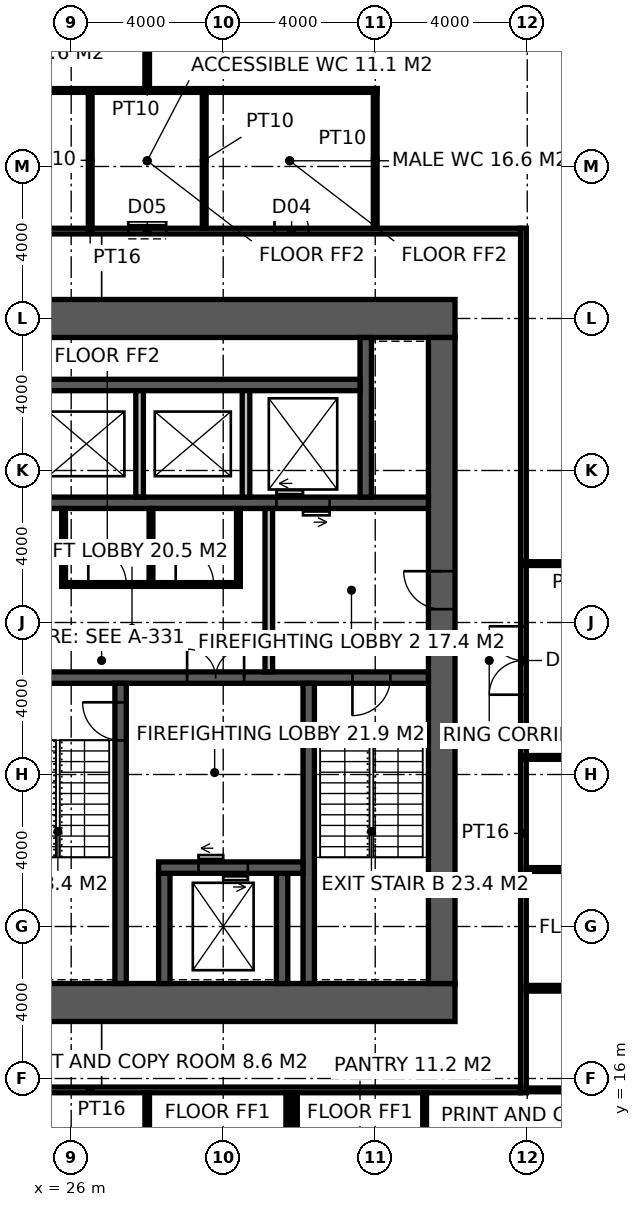
"""IFC4 building model, lengths in metres.
Left out: names, types, materials, properties, quantities, classifications, styles, units other than length and angle.
Written with IfcOpenShell. Run it as: python <this file> out.ifc"""

import sys

from ifc_helpers import new_model, si_unit, direction, frame, frame_2d, origin, place, context, subcontext, project, spatial, rectangle, extrude, element, fill, save


model = new_model("IFC4")
c1 = context("Model", 3, precision=1e-05, world=origin(), true_north=direction((0.0, 1.0)))
c2 = subcontext(c1, "Body", "Model", "MODEL_VIEW")
j1 = project(units=[si_unit("LENGTHUNIT", "METRE"), si_unit("PLANEANGLEUNIT", "RADIAN")], contexts=[c1])
p1 = place(None, origin())
s1 = spatial("IfcSite", under=j1, at=p1, CompositionType="ELEMENT")
p2 = place(p1, origin())
s2 = spatial("IfcBuilding", under=s1, at=p2, CompositionType="ELEMENT")
p3 = place(p2, frame((0.0, 0.0, 175.8)))
s3 = spatial("IfcBuildingStorey", under=s2, at=p3, CompositionType="ELEMENT", Elevation=175.8)
p4 = place(p3, frame((18.5, 18.0, -0.15), z_axis=(0.0, 0.0, 1.0), x_axis=(1.0, 0.0, 0.0)))
e1 = element("IfcWall", 1, at=p4, inside=s3, PredefinedType="SHEAR", context=c2, shape_type="SweptSolid", body=[
    extrude(rectangle(XDim=17.6, YDim=1.0, at=frame_2d((8.8, 0.0))), origin(), (0.0, 0.0, 1.0), 4.0),
])
p5 = place(p4, frame((3.45, 0.0, 0.15)))
e2 = element("IfcOpeningElement", 2, at=p5, cuts=e1, PredefinedType="OPENING", context=c2, shape_type="SweptSolid", body=[
    extrude(rectangle(XDim=1.5, YDim=2.4, at=frame_2d((0.75, 1.2))), frame((0.0, 0.51, 0.0), z_axis=(0.0, -1.0, 0.0), x_axis=(1.0, 0.0, 0.0)), (0.0, 0.0, 1.0), 1.02),
])
p6 = place(p3, frame((18.5, 36.0, -0.15), z_axis=(0.0, 0.0, 1.0), x_axis=(1.0, 0.0, 0.0)))
e3 = element("IfcWall", 3, at=p6, inside=s3, PredefinedType="SHEAR", context=c2, shape_type="SweptSolid", body=[
    extrude(rectangle(XDim=17.6, YDim=1.0, at=frame_2d((8.8, 0.0))), origin(), (0.0, 0.0, 1.0), 4.0),
])
p7 = place(p3, frame((35.75, 18.5, -0.15), z_axis=(0.0, 0.0, 1.0), x_axis=(0.0, 1.0, 0.0)))
e4 = element("IfcWall", 4, at=p7, inside=s3, PredefinedType="SHEAR", context=c2, shape_type="SweptSolid", body=[
    extrude(rectangle(XDim=17.0, YDim=0.7, at=frame_2d((8.5, 0.0))), origin(), (0.0, 0.0, 1.0), 4.0),
])
p8 = place(p7, frame((9.85, 0.0, 0.15)))
e5 = element("IfcOpeningElement", 5, at=p8, cuts=e4, PredefinedType="OPENING", context=c2, shape_type="SweptSolid", body=[
    extrude(rectangle(XDim=1.0, YDim=2.2, at=frame_2d((0.5, 1.1))), frame((0.0, 0.36, 0.0), z_axis=(0.0, -1.0, 0.0), x_axis=(1.0, 0.0, 0.0)), (0.0, 0.0, 1.0), 0.72),
])
p9 = place(p3, frame((24.15, 26.55, -0.15), z_axis=(0.0, 0.0, 1.0), x_axis=(1.0, 0.0, 0.0)))
e6 = element("IfcWall", 6, at=p9, inside=s3, PredefinedType="SHEAR", context=c2, shape_type="SweptSolid", body=[
    extrude(rectangle(XDim=11.25, YDim=0.3, at=frame_2d((5.625, 0.0))), origin(), (0.0, 0.0, 1.0), 4.0),
])
p10 = place(p9, frame((9.25, 0.0, 0.15)))
e7 = element("IfcOpeningElement", 7, at=p10, cuts=e6, PredefinedType="OPENING", context=c2, shape_type="SweptSolid", body=[
    extrude(rectangle(XDim=1.0, YDim=2.2, at=frame_2d((0.5, 1.1))), frame((0.0, 0.16, 0.0), z_axis=(0.0, -1.0, 0.0), x_axis=(1.0, 0.0, 0.0)), (0.0, 0.0, 1.0), 0.32),
])
p11 = place(p9, frame((4.9, 0.0, 0.15)))
e8 = element("IfcOpeningElement", 8, at=p11, cuts=e6, PredefinedType="OPENING", context=c2, shape_type="SweptSolid", body=[
    extrude(rectangle(XDim=1.5, YDim=2.4, at=frame_2d((0.75, 1.2))), frame((0.0, 0.16, 0.0), z_axis=(0.0, -1.0, 0.0), x_axis=(1.0, 0.0, 0.0)), (0.0, 0.0, 1.0), 0.32),
])
p12 = place(p3, frame((27.3, 18.5, -0.15), z_axis=(0.0, 0.0, 1.0), x_axis=(0.0, 1.0, 0.0)))
e9 = element("IfcWall", 9, at=p12, inside=s3, PredefinedType="SHEAR", context=c2, shape_type="SweptSolid", body=[
    extrude(rectangle(XDim=7.9, YDim=0.3, at=frame_2d((3.95, 0.0))), origin(), (0.0, 0.0, 1.0), 4.0),
])
p13 = place(p12, frame((6.4, 0.0, 0.15)))
e10 = element("IfcOpeningElement", 10, at=p13, cuts=e9, PredefinedType="OPENING", context=c2, shape_type="SweptSolid", body=[
    extrude(rectangle(XDim=1.0, YDim=2.2, at=frame_2d((0.5, 1.1))), frame((0.0, 0.16, 0.0), z_axis=(0.0, -1.0, 0.0), x_axis=(1.0, 0.0, 0.0)), (0.0, 0.0, 1.0), 0.32),
])
p14 = place(p3, frame((32.25, 18.5, -0.15), z_axis=(0.0, 0.0, 1.0), x_axis=(0.0, 1.0, 0.0)))
e11 = element("IfcWall", 11, at=p14, inside=s3, PredefinedType="SHEAR", context=c2, shape_type="SweptSolid", body=[
    extrude(rectangle(XDim=7.9, YDim=0.3, at=frame_2d((3.95, 0.0))), origin(), (0.0, 0.0, 1.0), 4.0),
])
for number, where, z_axis, x_axis in (
    (12, (28.45, 18.5, -0.15), (0.0, 0.0, 1.0), (0.0, 1.0, 0.0)),
    (13, (31.55, 18.5, -0.15), (0.0, 0.0, 1.0), (0.0, 1.0, 0.0)),
):
    element("IfcWall", number, at=place(p3, frame(where, z_axis=z_axis, x_axis=x_axis)), inside=s3, PredefinedType="SHEAR", context=c2, shape_type="SweptSolid", body=[
        extrude(rectangle(XDim=2.9, YDim=0.3, at=frame_2d((1.45, 0.0))), origin(), (0.0, 0.0, 1.0), 4.0),
    ])
p15 = place(p3, frame((28.3, 21.55, -0.15), z_axis=(0.0, 0.0, 1.0), x_axis=(1.0, 0.0, 0.0)))
e14 = element("IfcWall", 14, at=p15, inside=s3, PredefinedType="SHEAR", context=c2, shape_type="SweptSolid", body=[
    extrude(rectangle(XDim=3.8, YDim=0.3, at=frame_2d((1.9, 0.0))), origin(), (0.0, 0.0, 1.0), 4.0),
])
p16 = place(p15, frame((1.05, 0.0, 0.15)))
e15 = element("IfcOpeningElement", 15, at=p16, cuts=e14, PredefinedType="OPENING", context=c2, shape_type="SweptSolid", body=[
    extrude(rectangle(XDim=1.3, YDim=2.4, at=frame_2d((0.65, 1.2))), frame((0.0, 0.16, 0.0), z_axis=(0.0, -1.0, 0.0), x_axis=(1.0, 0.0, 0.0)), (0.0, 0.0, 1.0), 0.32),
])
p17 = place(p3, frame((24.15, 31.15, -0.15), z_axis=(0.0, 0.0, 1.0), x_axis=(1.0, 0.0, 0.0)))
e16 = element("IfcWall", 16, at=p17, inside=s3, PredefinedType="SHEAR", context=c2, shape_type="SweptSolid", body=[
    extrude(rectangle(XDim=11.25, YDim=0.3, at=frame_2d((5.625, 0.0))), origin(), (0.0, 0.0, 1.0), 4.0),
])
p18 = place(p17, frame((7.25, 0.0, 0.15)))
e17 = element("IfcOpeningElement", 17, at=p18, cuts=e16, PredefinedType="OPENING", context=c2, shape_type="SweptSolid", body=[
    extrude(rectangle(XDim=1.4, YDim=2.4, at=frame_2d((0.7, 1.2))), frame((0.0, 0.16, 0.0), z_axis=(0.0, -1.0, 0.0), x_axis=(1.0, 0.0, 0.0)), (0.0, 0.0, 1.0), 0.32),
])
p19 = place(p3, frame((33.75, 31.3, -0.15), z_axis=(0.0, 0.0, 1.0), x_axis=(0.0, 1.0, 0.0)))
e18 = element("IfcWall", 18, at=p19, inside=s3, PredefinedType="SHEAR", context=c2, shape_type="SweptSolid", body=[
    extrude(rectangle(XDim=4.2, YDim=0.3, at=frame_2d((2.1, 0.0))), origin(), (0.0, 0.0, 1.0), 4.0),
])
p20 = place(p3, frame((25.0, 34.25, -0.15), z_axis=(0.0, 0.0, 1.0), x_axis=(1.0, 0.0, 0.0)))
e19 = element("IfcWall", 19, at=p20, inside=s3, PredefinedType="SHEAR", context=c2, shape_type="SweptSolid", body=[
    extrude(rectangle(XDim=8.6, YDim=0.3, at=frame_2d((4.3, 0.0))), origin(), (0.0, 0.0, 1.0), 4.0),
])
for number, where, z_axis, x_axis in (
    (20, (27.8, 31.3, -0.15), (0.0, 0.0, 1.0), (0.0, 1.0, 0.0)),
    (21, (30.6, 31.3, -0.15), (0.0, 0.0, 1.0), (0.0, 1.0, 0.0)),
):
    element("IfcWall", number, at=place(p3, frame(where, z_axis=z_axis, x_axis=x_axis)), inside=s3, PredefinedType="SOLIDWALL", context=c2, shape_type="SweptSolid", body=[
        extrude(rectangle(XDim=2.8, YDim=0.2, at=frame_2d((1.4, 0.0))), origin(), (0.0, 0.0, 1.0), 4.0),
    ])
p21 = place(p3, frame((31.2, 26.7, 0.0), z_axis=(0.0, 0.0, 1.0), x_axis=(0.0, 1.0, 0.0)))
e22 = element("IfcWall", 22, at=p21, inside=s3, PredefinedType="SOLIDWALL", context=c2, shape_type="SweptSolid", body=[
    extrude(rectangle(XDim=4.3, YDim=0.2, at=frame_2d((2.15, 0.0))), origin(), (0.0, 0.0, 1.0), 3.85),
])
p22 = place(p3, frame((25.75, 29.0, 0.0), z_axis=(0.0, 0.0, 1.0), x_axis=(1.0, 0.0, 0.0)))
e23 = element("IfcWall", 23, at=p22, inside=s3, PredefinedType="PARTITIONING", context=c2, shape_type="SweptSolid", body=[
    extrude(rectangle(XDim=4.7, YDim=0.1, at=frame_2d((2.35, 0.0))), origin(), (0.0, 0.0, 1.0), 3.85),
])
p23 = place(p22, frame((0.7, 0.0, 0.0)))
e24 = element("IfcOpeningElement", 24, at=p23, cuts=e23, PredefinedType="OPENING", context=c2, shape_type="SweptSolid", body=[
    extrude(rectangle(XDim=1.0, YDim=2.2, at=frame_2d((0.5, 1.1))), frame((0.0, 0.06, 0.0), z_axis=(0.0, -1.0, 0.0), x_axis=(1.0, 0.0, 0.0)), (0.0, 0.0, 1.0), 0.12),
])
p24 = place(p22, frame((3.0, 0.0, 0.0)))
e25 = element("IfcOpeningElement", 25, at=p24, cuts=e23, PredefinedType="OPENING", context=c2, shape_type="SweptSolid", body=[
    extrude(rectangle(XDim=1.0, YDim=2.2, at=frame_2d((0.5, 1.1))), frame((0.0, 0.06, 0.0), z_axis=(0.0, -1.0, 0.0), x_axis=(1.0, 0.0, 0.0)), (0.0, 0.0, 1.0), 0.12),
])
for number, where, z_axis, x_axis in (
    (26, (25.8, 29.05, 0.0), (0.0, 0.0, 1.0), (0.0, 1.0, 0.0)),
    (27, (30.4, 29.05, 0.0), (0.0, 0.0, 1.0), (0.0, 1.0, 0.0)),
    (28, (28.1, 29.05, 0.0), (0.0, 0.0, 1.0), (0.0, 1.0, 0.0)),
):
    element("IfcWall", number, at=place(p3, frame(where, z_axis=z_axis, x_axis=x_axis)), inside=s3, PredefinedType="PARTITIONING", context=c2, shape_type="SweptSolid", body=[
        extrude(rectangle(XDim=1.95, YDim=0.1, at=frame_2d((0.975, 0.0))), origin(), (0.0, 0.0, 1.0), 3.85),
    ])
p25 = place(p3, frame((37.9, 15.625, 0.0), z_axis=(0.0, 0.0, 1.0), x_axis=(0.0, 1.0, 0.0)))
e29 = element("IfcWall", 29, at=p25, inside=s3, PredefinedType="PARTITIONING", context=c2, shape_type="SweptSolid", body=[
    extrude(rectangle(XDim=22.75, YDim=0.15, at=frame_2d((11.375, 0.0))), origin(), (0.0, 0.0, 1.0), 2.95),
])
p26 = place(p25, frame((10.475, 0.0, 0.0)))
e30 = element("IfcOpeningElement", 30, at=p26, cuts=e29, PredefinedType="OPENING", context=c2, shape_type="SweptSolid", body=[
    extrude(rectangle(XDim=1.8, YDim=2.4, at=frame_2d((0.9, 1.2))), frame((0.0, 0.085, 0.0), z_axis=(0.0, -1.0, 0.0), x_axis=(1.0, 0.0, 0.0)), (0.0, 0.0, 1.0), 0.17),
])
p27 = place(p3, frame((15.175, 15.7, 0.0), z_axis=(0.0, 0.0, 1.0), x_axis=(1.0, 0.0, 0.0)))
e31 = element("IfcWall", 31, at=p27, inside=s3, PredefinedType="PARTITIONING", context=c2, shape_type="SweptSolid", body=[
    extrude(rectangle(XDim=22.65, YDim=0.15, at=frame_2d((11.325, 0.0))), origin(), (0.0, 0.0, 1.0), 3.85),
])
p28 = place(p3, frame((15.175, 38.3, 0.0), z_axis=(0.0, 0.0, 1.0), x_axis=(1.0, 0.0, 0.0)))
e32 = element("IfcWall", 32, at=p28, inside=s3, PredefinedType="PARTITIONING", context=c2, shape_type="SweptSolid", body=[
    extrude(rectangle(XDim=22.65, YDim=0.15, at=frame_2d((11.325, 0.0))), origin(), (0.0, 0.0, 1.0), 3.85),
])
p29 = place(p28, frame((8.575, 0.0, 0.0)))
e33 = element("IfcOpeningElement", 33, at=p29, cuts=e32, PredefinedType="OPENING", context=c2, shape_type="SweptSolid", body=[
    extrude(rectangle(XDim=0.9, YDim=2.1, at=frame_2d((0.45, 1.05))), frame((0.0, 0.085, 0.0), z_axis=(0.0, -1.0, 0.0), x_axis=(1.0, 0.0, 0.0)), (0.0, 0.0, 1.0), 0.17),
])
p30 = place(p28, frame((12.325, 0.0, 0.0)))
e34 = element("IfcOpeningElement", 34, at=p30, cuts=e32, PredefinedType="OPENING", context=c2, shape_type="SweptSolid", body=[
    extrude(rectangle(XDim=1.0, YDim=2.1, at=frame_2d((0.5, 1.05))), frame((0.0, 0.085, 0.0), z_axis=(0.0, -1.0, 0.0), x_axis=(1.0, 0.0, 0.0)), (0.0, 0.0, 1.0), 0.17),
])
p31 = place(p28, frame((16.175, 0.0, 0.0)))
e35 = element("IfcOpeningElement", 35, at=p31, cuts=e32, PredefinedType="OPENING", context=c2, shape_type="SweptSolid", body=[
    extrude(rectangle(XDim=0.9, YDim=2.1, at=frame_2d((0.45, 1.05))), frame((0.0, 0.085, 0.0), z_axis=(0.0, -1.0, 0.0), x_axis=(1.0, 0.0, 0.0)), (0.0, 0.0, 1.0), 0.17),
])
p32 = place(p3, frame((34.0, 38.375, 0.0), z_axis=(0.0, 0.0, 1.0), x_axis=(0.0, 1.0, 0.0)))
e36 = element("IfcWall", 36, at=p32, inside=s3, PredefinedType="PARTITIONING", context=c2, shape_type="SweptSolid", body=[
    extrude(rectangle(XDim=3.675, YDim=0.1, at=frame_2d((1.837, 0.0))), origin(), (0.0, 0.0, 1.0), 2.95),
])
p33 = place(p3, frame((21.95, 42.0, 0.0), z_axis=(0.0, 0.0, 1.0), x_axis=(1.0, 0.0, 0.0)))
e37 = element("IfcWall", 37, at=p33, inside=s3, PredefinedType="PARTITIONING", context=c2, shape_type="SweptSolid", body=[
    extrude(rectangle(XDim=12.1, YDim=0.1, at=frame_2d((6.05, 0.0))), origin(), (0.0, 0.0, 1.0), 3.85),
])
for number, where, z_axis, x_axis in (
    (38, (26.5, 38.375, 0.0), (0.0, 0.0, 1.0), (0.0, 1.0, 0.0)),
    (39, (29.5, 38.375, 0.0), (0.0, 0.0, 1.0), (0.0, 1.0, 0.0)),
):
    element("IfcWall", number, at=place(p3, frame(where, z_axis=z_axis, x_axis=x_axis)), inside=s3, PredefinedType="PARTITIONING", context=c2, shape_type="SweptSolid", body=[
        extrude(rectangle(XDim=3.575, YDim=0.1, at=frame_2d((1.788, 0.0))), origin(), (0.0, 0.0, 1.0), 3.85),
    ])
p34 = place(p3, frame((28.0, 8.3, 0.0), z_axis=(0.0, 0.0, 1.0), x_axis=(0.0, 1.0, 0.0)))
e40 = element("IfcWall", 40, at=p34, inside=s3, PredefinedType="PARTITIONING", context=c2, shape_type="SweptSolid", body=[
    extrude(rectangle(XDim=7.325, YDim=0.12, at=frame_2d((3.663, 0.0))), origin(), (0.0, 0.0, 1.0), 3.85),
])
p35 = place(p3, frame((28.0, 42.05, 0.0), z_axis=(0.0, 0.0, 1.0), x_axis=(0.0, 1.0, 0.0)))
e41 = element("IfcWall", 41, at=p35, inside=s3, PredefinedType="PARTITIONING", context=c2, shape_type="SweptSolid", body=[
    extrude(rectangle(XDim=13.65, YDim=0.12, at=frame_2d((6.825, 0.0))), origin(), (0.0, 0.0, 1.0), 3.85),
])
for number, where, z_axis, x_axis in (
    (42, (37.975, 15.7, 0.0), (0.0, 0.0, 1.0), (1.0, 0.0, 0.0)),
    (43, (37.975, 18.35, 0.0), (0.0, 0.0, 1.0), (1.0, 0.0, 0.0)),
    (44, (37.975, 18.4, 0.0), (0.0, 0.0, 1.0), (1.0, 0.0, 0.0)),
    (45, (37.975, 21.5, 0.0), (0.0, 0.0, 1.0), (1.0, 0.0, 0.0)),
):
    element("IfcWall", number, at=place(p3, frame(where, z_axis=z_axis, x_axis=x_axis)), inside=s3, PredefinedType="PARTITIONING", context=c2, shape_type="SweptSolid", body=[
        extrude(rectangle(XDim=3.575, YDim=0.1, at=frame_2d((1.788, 0.0))), origin(), (0.0, 0.0, 1.0), 3.85),
    ])
for number, where, z_axis, x_axis in (
    (46, (31.7, 12.15, 0.0), (0.0, 0.0, 1.0), (0.0, 1.0, 0.0)),
    (47, (31.9, 12.15, 0.0), (0.0, 0.0, 1.0), (0.0, 1.0, 0.0)),
    (48, (35.3, 12.15, 0.0), (0.0, 0.0, 1.0), (0.0, 1.0, 0.0)),
):
    element("IfcWall", number, at=place(p3, frame(where, z_axis=z_axis, x_axis=x_axis)), inside=s3, PredefinedType="PARTITIONING", context=c2, shape_type="SweptSolid", body=[
        extrude(rectangle(XDim=3.475, YDim=0.1, at=frame_2d((1.738, 0.0))), origin(), (0.0, 0.0, 1.0), 3.85),
    ])
for number, where, z_axis, x_axis in (
    (49, (37.9, 24.45, 0.0), (0.0, 0.0, 1.0), (1.0, 0.0, 0.0)),
    (50, (42.4, 29.55, 0.0), (0.0, 0.0, 1.0), (-1.0, 0.0, 0.0)),
):
    element("IfcWall", number, at=place(p3, frame(where, z_axis=z_axis, x_axis=x_axis)), inside=s3, PredefinedType="PARTITIONING", context=c2, shape_type="SweptSolid", body=[
        extrude(rectangle(XDim=4.5, YDim=0.1, at=frame_2d((2.25, 0.0))), origin(), (0.0, 0.0, 1.0), 3.85),
    ])
p36 = place(p13, origin())
e51 = element("IfcDoor", 51, at=p36, inside=s3, OperationType="SINGLE_SWING_RIGHT", PredefinedType="DOOR", context=c2, shape_type="SweptSolid", body=[
    extrude(rectangle(XDim=1.0, YDim=2.2, at=frame_2d((0.5, 1.1))), frame((0.0, 0.025, 0.0), z_axis=(0.0, -1.0, 0.0), x_axis=(1.0, 0.0, 0.0)), (0.0, 0.0, 1.0), 0.05),
])
fill(e10, e51)
p37 = place(p10, frame((1.0, 0.0, 0.0), z_axis=(0.0, 0.0, 1.0), x_axis=(-1.0, 0.0, 0.0)))
e52 = element("IfcDoor", 52, at=p37, inside=s3, OperationType="SINGLE_SWING_RIGHT", PredefinedType="DOOR", context=c2, shape_type="SweptSolid", body=[
    extrude(rectangle(XDim=1.0, YDim=2.2, at=frame_2d((0.5, 1.1))), frame((0.0, 0.025, 0.0), z_axis=(0.0, -1.0, 0.0), x_axis=(1.0, 0.0, 0.0)), (0.0, 0.0, 1.0), 0.05),
])
fill(e7, e52)
p38 = place(p8, origin())
e53 = element("IfcDoor", 53, at=p38, inside=s3, OperationType="SINGLE_SWING_RIGHT", PredefinedType="DOOR", context=c2, shape_type="SweptSolid", body=[
    extrude(rectangle(XDim=1.0, YDim=2.2, at=frame_2d((0.5, 1.1))), frame((0.0, 0.025, 0.0), z_axis=(0.0, -1.0, 0.0), x_axis=(1.0, 0.0, 0.0)), (0.0, 0.0, 1.0), 0.05),
])
fill(e5, e53)
p39 = place(p11, origin())
e54 = element("IfcDoor", 54, at=p39, inside=s3, OperationType="DOUBLE_DOOR_DOUBLE_SWING", PredefinedType="DOOR", context=c2, shape_type="SweptSolid", body=[
    extrude(rectangle(XDim=1.5, YDim=2.4, at=frame_2d((0.75, 1.2))), frame((0.0, 0.025, 0.0), z_axis=(0.0, -1.0, 0.0), x_axis=(1.0, 0.0, 0.0)), (0.0, 0.0, 1.0), 0.05),
])
fill(e8, e54)
p40 = place(p23, origin())
e55 = element("IfcDoor", 55, at=p40, inside=s3, OperationType="SINGLE_SWING_LEFT", PredefinedType="DOOR", context=c2, shape_type="SweptSolid", body=[
    extrude(rectangle(XDim=1.0, YDim=2.2, at=frame_2d((0.5, 1.1))), frame((0.0, 0.025, 0.0), z_axis=(0.0, -1.0, 0.0), x_axis=(1.0, 0.0, 0.0)), (0.0, 0.0, 1.0), 0.05),
])
fill(e24, e55)
p41 = place(p24, origin())
e56 = element("IfcDoor", 56, at=p41, inside=s3, OperationType="SINGLE_SWING_LEFT", PredefinedType="DOOR", context=c2, shape_type="SweptSolid", body=[
    extrude(rectangle(XDim=1.0, YDim=2.2, at=frame_2d((0.5, 1.1))), frame((0.0, 0.025, 0.0), z_axis=(0.0, -1.0, 0.0), x_axis=(1.0, 0.0, 0.0)), (0.0, 0.0, 1.0), 0.05),
])
fill(e25, e56)
p42 = place(p30, origin())
e57 = element("IfcDoor", 57, at=p42, inside=s3, OperationType="SLIDING_TO_LEFT", PredefinedType="DOOR", context=c2, shape_type="SweptSolid", body=[
    extrude(rectangle(XDim=1.0, YDim=2.1, at=frame_2d((0.5, 1.05))), frame((0.0, 0.025, 0.0), z_axis=(0.0, -1.0, 0.0), x_axis=(1.0, 0.0, 0.0)), (0.0, 0.0, 1.0), 0.05),
])
fill(e34, e57)
p43 = place(p31, origin())
e58 = element("IfcDoor", 58, at=p43, inside=s3, OperationType="SINGLE_SWING_LEFT", PredefinedType="DOOR", context=c2, shape_type="SweptSolid", body=[
    extrude(rectangle(XDim=0.9, YDim=2.1, at=frame_2d((0.45, 1.05))), frame((0.0, 0.025, 0.0), z_axis=(0.0, -1.0, 0.0), x_axis=(1.0, 0.0, 0.0)), (0.0, 0.0, 1.0), 0.05),
])
fill(e35, e58)
p44 = place(p26, origin())
e59 = element("IfcDoor", 59, at=p44, inside=s3, OperationType="DOUBLE_DOOR_DOUBLE_SWING", PredefinedType="DOOR", context=c2, shape_type="SweptSolid", body=[
    extrude(rectangle(XDim=1.8, YDim=2.4, at=frame_2d((0.9, 1.2))), frame((0.0, 0.025, 0.0), z_axis=(0.0, -1.0, 0.0), x_axis=(1.0, 0.0, 0.0)), (0.0, 0.0, 1.0), 0.05),
])
fill(e30, e59)
p45 = place(p16, origin())
e60 = element("IfcDoor", 60, at=p45, inside=s3, OperationType="DOUBLE_DOOR_SLIDING", PredefinedType="DOOR", context=c2, shape_type="SweptSolid", body=[
    extrude(rectangle(XDim=1.3, YDim=2.4, at=frame_2d((0.65, 1.2))), frame((0.0, 0.025, 0.0), z_axis=(0.0, -1.0, 0.0), x_axis=(1.0, 0.0, 0.0)), (0.0, 0.0, 1.0), 0.05),
])
fill(e15, e60)
p46 = place(p18, origin())
e61 = element("IfcDoor", 61, at=p46, inside=s3, OperationType="DOUBLE_DOOR_SLIDING", PredefinedType="DOOR", context=c2, shape_type="SweptSolid", body=[
    extrude(rectangle(XDim=1.4, YDim=2.4, at=frame_2d((0.7, 1.2))), frame((0.0, 0.025, 0.0), z_axis=(0.0, -1.0, 0.0), x_axis=(1.0, 0.0, 0.0)), (0.0, 0.0, 1.0), 0.05),
])
fill(e17, e61)
save(model, sys.argv[1])
